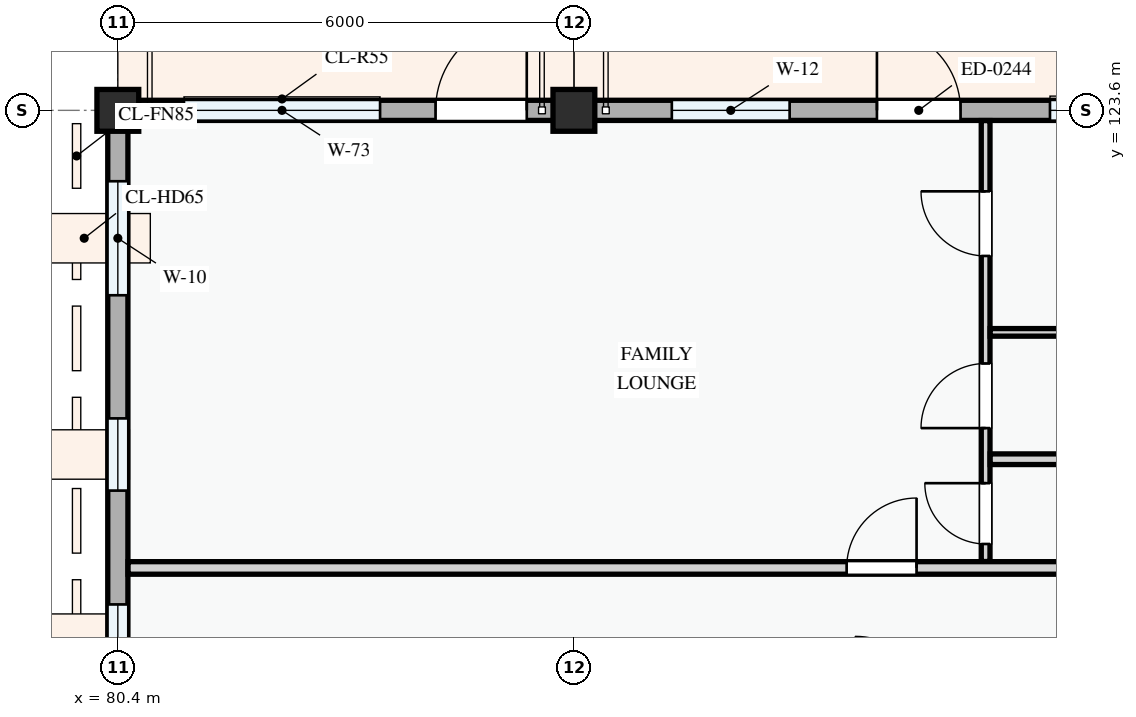
"""IFC4 building model, lengths in metres.
Left out: names, types, materials, properties, quantities, classifications, styles, units other than length and angle.
Written with IfcOpenShell. Run it as: python <this file> out.ifc"""

import sys

from ifc_helpers import new_model, si_unit, direction, frame, frame_2d, origin, origin_2d, place, context, subcontext, project, spatial, rectangle, extrude, element, fill, save


model = new_model("IFC4")
c1 = context("Model", 3, precision=1e-05, world=origin(), true_north=direction((0.0, 1.0)))
c2 = subcontext(c1, "Body", "Model", "MODEL_VIEW")
j1 = project(units=[si_unit("LENGTHUNIT", "METRE"), si_unit("PLANEANGLEUNIT", "RADIAN")], contexts=[c1])
p1 = place(None, origin())
s1 = spatial("IfcSite", under=j1, at=p1, CompositionType="ELEMENT")
p2 = place(p1, origin())
s2 = spatial("IfcBuilding", under=s1, at=p2, CompositionType="ELEMENT")
p3 = place(p2, frame((0.0, 0.0, 31.2)))
s3 = spatial("IfcBuildingStorey", under=s2, at=p3, CompositionType="ELEMENT", Elevation=31.2)
for number, where, z_axis, x_axis in (
    (1, (80.4, 123.6, 0.0), (0.0, 0.0, 1.0), (1.0, 0.0, 0.0)),
    (2, (86.4, 123.6, 0.0), (0.0, 0.0, 1.0), (1.0, 0.0, 0.0)),
):
    element("IfcColumn", number, at=place(p3, frame(where, z_axis=z_axis, x_axis=x_axis)), inside=s3, PredefinedType="COLUMN", context=c2, shape_type="SweptSolid", body=[
        extrude(rectangle(XDim=0.55, YDim=0.55, at=origin_2d()), origin(), (0.0, 0.0, 1.0), 3.3),
    ])
p4 = place(p3, frame((94.8, 123.6, 0.0), z_axis=(0.0, 0.0, 1.0), x_axis=(-1.0, 0.0, 0.0)))
e3 = element("IfcWall", 3, at=p4, inside=s3, PredefinedType="STANDARD", context=c2, shape_type="SweptSolid", body=[
    extrude(rectangle(XDim=8.4, YDim=0.265, at=frame_2d((4.2, 0.0))), origin(), (0.0, 0.0, 1.0), 2.375),
])
p5 = place(p4, frame((3.313, 0.0, 0.0)))
e4 = element("IfcOpeningElement", 4, at=p5, cuts=e3, PredefinedType="OPENING", context=c2, shape_type="SweptSolid", body=[
    extrude(rectangle(XDim=1.1, YDim=2.15, at=frame_2d((0.55, 1.075))), frame((0.0, 0.143, 0.0), z_axis=(0.0, -1.0, 0.0), x_axis=(1.0, 0.0, 0.0)), (0.0, 0.0, 1.0), 0.285),
])
p6 = place(p4, frame((1.037, 0.0, 0.78)))
e5 = element("IfcOpeningElement", 5, at=p6, cuts=e3, PredefinedType="OPENING", context=c2, shape_type="SweptSolid", body=[
    extrude(rectangle(XDim=1.1, YDim=1.3, at=frame_2d((0.55, 0.65))), frame((0.0, 0.143, 0.0), z_axis=(0.0, -1.0, 0.0), x_axis=(1.0, 0.0, 0.0)), (0.0, 0.0, 1.0), 0.285),
])
p7 = place(p4, frame((5.562, 0.0, 0.78)))
e6 = element("IfcOpeningElement", 6, at=p7, cuts=e3, PredefinedType="OPENING", context=c2, shape_type="SweptSolid", body=[
    extrude(rectangle(XDim=1.55, YDim=1.4, at=frame_2d((0.775, 0.7))), frame((0.0, 0.143, 0.0), z_axis=(0.0, -1.0, 0.0), x_axis=(1.0, 0.0, 0.0)), (0.0, 0.0, 1.0), 0.285),
])
p8 = place(p3, frame((86.4, 123.6, 0.0), z_axis=(0.0, 0.0, 1.0), x_axis=(-1.0, 0.0, 0.0)))
e7 = element("IfcWall", 7, at=p8, inside=s3, PredefinedType="STANDARD", context=c2, shape_type="SweptSolid", body=[
    extrude(rectangle(XDim=6.0, YDim=0.265, at=frame_2d((3.0, 0.0))), origin(), (0.0, 0.0, 1.0), 2.525),
])
p9 = place(p8, frame((0.62, 0.0, 0.0)))
e8 = element("IfcOpeningElement", 8, at=p9, cuts=e7, PredefinedType="OPENING", context=c2, shape_type="SweptSolid", body=[
    extrude(rectangle(XDim=1.2, YDim=2.15, at=frame_2d((0.6, 1.075))), frame((0.0, 0.143, 0.0), z_axis=(0.0, -1.0, 0.0), x_axis=(1.0, 0.0, 0.0)), (0.0, 0.0, 1.0), 0.285),
])
p10 = place(p8, frame((2.55, 0.0, 0.78)))
e9 = element("IfcOpeningElement", 9, at=p10, cuts=e7, PredefinedType="OPENING", context=c2, shape_type="SweptSolid", body=[
    extrude(rectangle(XDim=2.58, YDim=1.48, at=frame_2d((1.29, 0.74))), frame((0.0, 0.143, 0.0), z_axis=(0.0, -1.0, 0.0), x_axis=(1.0, 0.0, 0.0)), (0.0, 0.0, 1.0), 0.285),
])
p11 = place(p3, frame((80.4, 123.6, 0.0), z_axis=(0.0, 0.0, 1.0), x_axis=(0.0, -1.0, 0.0)))
e10 = element("IfcWall", 10, at=p11, inside=s3, PredefinedType="STANDARD", context=c2, shape_type="SweptSolid", body=[
    extrude(rectangle(XDim=8.4, YDim=0.265, at=frame_2d((4.2, 0.0))), origin(), (0.0, 0.0, 1.0), 2.425),
])
p12 = place(p11, frame((0.933, 0.0, 0.78)))
e11 = element("IfcOpeningElement", 11, at=p12, cuts=e10, PredefinedType="OPENING", context=c2, shape_type="SweptSolid", body=[
    extrude(rectangle(XDim=1.5, YDim=1.5, at=frame_2d((0.75, 0.75))), frame((0.0, 0.143, 0.0), z_axis=(0.0, -1.0, 0.0), x_axis=(1.0, 0.0, 0.0)), (0.0, 0.0, 1.0), 0.285),
])
p13 = place(p11, frame((4.052, 0.0, 0.78)))
e12 = element("IfcOpeningElement", 12, at=p13, cuts=e10, PredefinedType="OPENING", context=c2, shape_type="SweptSolid", body=[
    extrude(rectangle(XDim=0.95, YDim=1.15, at=frame_2d((0.475, 0.575))), frame((0.0, 0.143, 0.0), z_axis=(0.0, -1.0, 0.0), x_axis=(1.0, 0.0, 0.0)), (0.0, 0.0, 1.0), 0.285),
])
p14 = place(p11, frame((6.5, 0.0, 0.78)))
e13 = element("IfcOpeningElement", 13, at=p14, cuts=e10, PredefinedType="OPENING", context=c2, shape_type="SweptSolid", body=[
    extrude(rectangle(XDim=0.9, YDim=1.2, at=frame_2d((0.45, 0.6))), frame((0.0, 0.143, 0.0), z_axis=(0.0, -1.0, 0.0), x_axis=(1.0, 0.0, 0.0)), (0.0, 0.0, 1.0), 0.285),
])
p15 = place(p3, frame((91.817, 117.665, 0.0), z_axis=(0.0, 0.0, 1.0), x_axis=(0.0, 1.0, 0.0)))
e14 = element("IfcWall", 14, at=p15, inside=s3, PredefinedType="PARTITIONING", context=c2, shape_type="SweptSolid", body=[
    extrude(rectangle(XDim=5.801, YDim=0.115, at=frame_2d((2.9, 0.0))), origin(), (0.0, 0.0, 1.0), 3.0),
])
p16 = place(p15, frame((0.231, 0.0, 0.0)))
e15 = element("IfcOpeningElement", 15, at=p16, cuts=e14, PredefinedType="OPENING", context=c2, shape_type="SweptSolid", body=[
    extrude(rectangle(XDim=0.8, YDim=2.1, at=frame_2d((0.4, 1.05))), frame((0.0, 0.067, 0.0), z_axis=(0.0, -1.0, 0.0), x_axis=(1.0, 0.0, 0.0)), (0.0, 0.0, 1.0), 0.135),
])
p17 = place(p15, frame((1.755, 0.0, 0.0)))
e16 = element("IfcOpeningElement", 16, at=p17, cuts=e14, PredefinedType="OPENING", context=c2, shape_type="SweptSolid", body=[
    extrude(rectangle(XDim=0.85, YDim=2.1, at=frame_2d((0.425, 1.05))), frame((0.0, 0.067, 0.0), z_axis=(0.0, -1.0, 0.0), x_axis=(1.0, 0.0, 0.0)), (0.0, 0.0, 1.0), 0.135),
])
p18 = place(p15, frame((4.02, 0.0, 0.0)))
e17 = element("IfcOpeningElement", 17, at=p18, cuts=e14, PredefinedType="OPENING", context=c2, shape_type="SweptSolid", body=[
    extrude(rectangle(XDim=0.85, YDim=2.1, at=frame_2d((0.425, 1.05))), frame((0.0, 0.067, 0.0), z_axis=(0.0, -1.0, 0.0), x_axis=(1.0, 0.0, 0.0)), (0.0, 0.0, 1.0), 0.135),
])
p19 = place(p3, frame((91.876, 120.679, 0.0), z_axis=(0.0, 0.0, 1.0), x_axis=(1.0, 0.0, 0.0)))
e18 = element("IfcWall", 18, at=p19, inside=s3, PredefinedType="PARTITIONING", context=c2, shape_type="SweptSolid", body=[
    extrude(rectangle(XDim=12.149, YDim=0.1, at=frame_2d((6.075, 0.0))), origin(), (0.0, 0.0, 1.0), 3.0),
])
p20 = place(p3, frame((91.876, 119.01, 0.0), z_axis=(0.0, 0.0, 1.0), x_axis=(1.0, 0.0, 0.0)))
e19 = element("IfcWall", 19, at=p20, inside=s3, PredefinedType="PARTITIONING", context=c2, shape_type="SweptSolid", body=[
    extrude(rectangle(XDim=12.149, YDim=0.14, at=frame_2d((6.075, 0.0))), origin(), (0.0, 0.0, 1.0), 3.0),
])
p21 = place(p3, frame((80.534, 117.58, 0.0), z_axis=(0.0, 0.0, 1.0), x_axis=(1.0, 0.0, 0.0)))
e20 = element("IfcWall", 20, at=p21, inside=s3, PredefinedType="PARTITIONING", context=c2, shape_type="SweptSolid", body=[
    extrude(rectangle(XDim=72.006, YDim=0.165, at=frame_2d((36.003, 0.0))), origin(), (0.0, 0.0, 1.0), 3.0),
])
p22 = place(p21, frame((9.454, 0.0, 0.0)))
e21 = element("IfcOpeningElement", 21, at=p22, cuts=e20, PredefinedType="OPENING", context=c2, shape_type="SweptSolid", body=[
    extrude(rectangle(XDim=0.92, YDim=2.1, at=frame_2d((0.46, 1.05))), frame((0.0, 0.093, 0.0), z_axis=(0.0, -1.0, 0.0), x_axis=(1.0, 0.0, 0.0)), (0.0, 0.0, 1.0), 0.185),
])
p23 = place(p21, frame((23.835, 0.0, 0.0)))
e22 = element("IfcOpeningElement", 22, at=p23, cuts=e20, PredefinedType="OPENING", context=c2, shape_type="SweptSolid", body=[
    extrude(rectangle(XDim=0.92, YDim=2.1, at=frame_2d((0.46, 1.05))), frame((0.0, 0.093, 0.0), z_axis=(0.0, -1.0, 0.0), x_axis=(1.0, 0.0, 0.0)), (0.0, 0.0, 1.0), 0.185),
])
p24 = place(p21, frame((52.76, 0.0, 0.0)))
e23 = element("IfcOpeningElement", 23, at=p24, cuts=e20, PredefinedType="OPENING", context=c2, shape_type="SweptSolid", body=[
    extrude(rectangle(XDim=0.96, YDim=2.12, at=frame_2d((0.48, 1.06))), frame((0.0, 0.093, 0.0), z_axis=(0.0, -1.0, 0.0), x_axis=(1.0, 0.0, 0.0)), (0.0, 0.0, 1.0), 0.185),
])
p25 = place(p5, frame((1.1, 0.0, 0.0), z_axis=(0.0, 0.0, 1.0), x_axis=(-1.0, 0.0, 0.0)))
e24 = element("IfcDoor", 24, at=p25, inside=s3, OperationType="SINGLE_SWING_LEFT", PredefinedType="DOOR", context=c2, shape_type="SweptSolid", body=[
    extrude(rectangle(XDim=1.1, YDim=2.15, at=frame_2d((0.55, 1.075))), frame((0.0, 0.025, 0.0), z_axis=(0.0, -1.0, 0.0), x_axis=(1.0, 0.0, 0.0)), (0.0, 0.0, 1.0), 0.05),
])
fill(e4, e24)
p26 = place(p6, origin())
e25 = element("IfcWindow", 25, at=p26, inside=s3, PartitioningType="SINGLE_PANEL", PredefinedType="WINDOW", context=c2, shape_type="SweptSolid", body=[
    extrude(rectangle(XDim=1.1, YDim=1.3, at=frame_2d((0.55, 0.65))), frame((0.0, 0.03, 0.0), z_axis=(0.0, -1.0, 0.0), x_axis=(1.0, 0.0, 0.0)), (0.0, 0.0, 1.0), 0.06),
])
fill(e5, e25)
p27 = place(p7, origin())
e26 = element("IfcWindow", 26, at=p27, inside=s3, PartitioningType="SINGLE_PANEL", PredefinedType="WINDOW", context=c2, shape_type="SweptSolid", body=[
    extrude(rectangle(XDim=1.55, YDim=1.4, at=frame_2d((0.775, 0.7))), frame((0.0, 0.03, 0.0), z_axis=(0.0, -1.0, 0.0), x_axis=(1.0, 0.0, 0.0)), (0.0, 0.0, 1.0), 0.06),
])
fill(e6, e26)
p28 = place(p9, frame((1.2, 0.0, 0.0), z_axis=(0.0, 0.0, 1.0), x_axis=(-1.0, 0.0, 0.0)))
e27 = element("IfcDoor", 27, at=p28, inside=s3, OperationType="SINGLE_SWING_RIGHT", PredefinedType="DOOR", context=c2, shape_type="SweptSolid", body=[
    extrude(rectangle(XDim=1.2, YDim=2.15, at=frame_2d((0.6, 1.075))), frame((0.0, 0.025, 0.0), z_axis=(0.0, -1.0, 0.0), x_axis=(1.0, 0.0, 0.0)), (0.0, 0.0, 1.0), 0.05),
])
fill(e8, e27)
p29 = place(p10, origin())
e28 = element("IfcWindow", 28, at=p29, inside=s3, PartitioningType="DOUBLE_PANEL_VERTICAL", PredefinedType="WINDOW", context=c2, shape_type="SweptSolid", body=[
    extrude(rectangle(XDim=2.58, YDim=1.48, at=frame_2d((1.29, 0.74))), frame((0.0, 0.03, 0.0), z_axis=(0.0, -1.0, 0.0), x_axis=(1.0, 0.0, 0.0)), (0.0, 0.0, 1.0), 0.06),
])
fill(e9, e28)
p30 = place(p12, origin())
e29 = element("IfcWindow", 29, at=p30, inside=s3, PartitioningType="SINGLE_PANEL", PredefinedType="WINDOW", context=c2, shape_type="SweptSolid", body=[
    extrude(rectangle(XDim=1.5, YDim=1.5, at=frame_2d((0.75, 0.75))), frame((0.0, 0.03, 0.0), z_axis=(0.0, -1.0, 0.0), x_axis=(1.0, 0.0, 0.0)), (0.0, 0.0, 1.0), 0.06),
])
fill(e11, e29)
p31 = place(p13, origin())
e30 = element("IfcWindow", 30, at=p31, inside=s3, PartitioningType="SINGLE_PANEL", PredefinedType="WINDOW", context=c2, shape_type="SweptSolid", body=[
    extrude(rectangle(XDim=0.95, YDim=1.15, at=frame_2d((0.475, 0.575))), frame((0.0, 0.03, 0.0), z_axis=(0.0, -1.0, 0.0), x_axis=(1.0, 0.0, 0.0)), (0.0, 0.0, 1.0), 0.06),
])
fill(e12, e30)
p32 = place(p14, origin())
e31 = element("IfcWindow", 31, at=p32, inside=s3, PartitioningType="SINGLE_PANEL", PredefinedType="WINDOW", context=c2, shape_type="SweptSolid", body=[
    extrude(rectangle(XDim=0.9, YDim=1.2, at=frame_2d((0.45, 0.6))), frame((0.0, 0.03, 0.0), z_axis=(0.0, -1.0, 0.0), x_axis=(1.0, 0.0, 0.0)), (0.0, 0.0, 1.0), 0.06),
])
fill(e13, e31)
p33 = place(p16, origin())
e32 = element("IfcDoor", 32, at=p33, inside=s3, OperationType="SINGLE_SWING_RIGHT", PredefinedType="DOOR", context=c2, shape_type="SweptSolid", body=[
    extrude(rectangle(XDim=0.8, YDim=2.1, at=frame_2d((0.4, 1.05))), frame((0.0, 0.025, 0.0), z_axis=(0.0, -1.0, 0.0), x_axis=(1.0, 0.0, 0.0)), (0.0, 0.0, 1.0), 0.05),
])
fill(e15, e32)
p34 = place(p17, origin())
e33 = element("IfcDoor", 33, at=p34, inside=s3, OperationType="SINGLE_SWING_LEFT", PredefinedType="DOOR", context=c2, shape_type="SweptSolid", body=[
    extrude(rectangle(XDim=0.85, YDim=2.1, at=frame_2d((0.425, 1.05))), frame((0.0, 0.025, 0.0), z_axis=(0.0, -1.0, 0.0), x_axis=(1.0, 0.0, 0.0)), (0.0, 0.0, 1.0), 0.05),
])
fill(e16, e33)
p35 = place(p18, origin())
e34 = element("IfcDoor", 34, at=p35, inside=s3, OperationType="SINGLE_SWING_RIGHT", PredefinedType="DOOR", context=c2, shape_type="SweptSolid", body=[
    extrude(rectangle(XDim=0.85, YDim=2.1, at=frame_2d((0.425, 1.05))), frame((0.0, 0.025, 0.0), z_axis=(0.0, -1.0, 0.0), x_axis=(1.0, 0.0, 0.0)), (0.0, 0.0, 1.0), 0.05),
])
fill(e17, e34)
p36 = place(p22, origin())
e35 = element("IfcDoor", 35, at=p36, inside=s3, OperationType="SINGLE_SWING_RIGHT", PredefinedType="DOOR", context=c2, shape_type="SweptSolid", body=[
    extrude(rectangle(XDim=0.92, YDim=2.1, at=frame_2d((0.46, 1.05))), frame((0.0, 0.025, 0.0), z_axis=(0.0, -1.0, 0.0), x_axis=(1.0, 0.0, 0.0)), (0.0, 0.0, 1.0), 0.05),
])
fill(e21, e35)
save(model, sys.argv[1])
